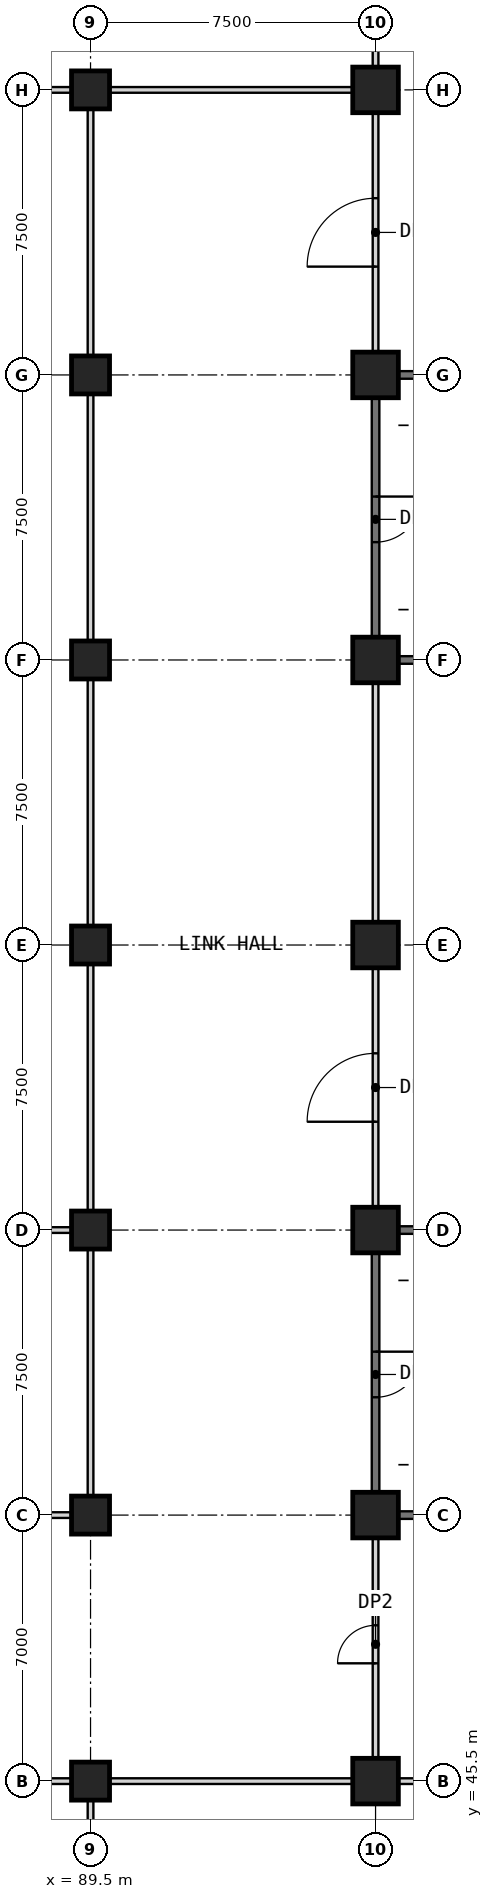
"""IFC4 building model, lengths in metres.
Left out: names, types, materials, properties, quantities, classifications, styles, units other than length and angle.
Written with IfcOpenShell. Run it as: python <this file> out.ifc"""

import sys

from ifc_helpers import new_model, si_unit, direction, frame, frame_2d, origin, origin_2d, place, context, subcontext, project, spatial, rectangle, extrude, element, fill, save


model = new_model("IFC4")
c1 = context("Model", 3, precision=1e-05, world=origin(), true_north=direction((0.0, 1.0)))
c2 = subcontext(c1, "Body", "Model", "MODEL_VIEW")
j1 = project(units=[si_unit("LENGTHUNIT", "METRE"), si_unit("PLANEANGLEUNIT", "RADIAN")], contexts=[c1])
p1 = place(None, origin())
s1 = spatial("IfcSite", under=j1, at=p1, CompositionType="ELEMENT")
p2 = place(p1, origin())
s2 = spatial("IfcBuilding", under=s1, at=p2, CompositionType="ELEMENT")
p3 = place(p2, frame((0.0, 0.0, 23.5)))
s3 = spatial("IfcBuildingStorey", under=s2, at=p3, CompositionType="ELEMENT", Elevation=23.5)
for number, where, z_axis, x_axis in (
    (1, (89.5, 45.5, 0.0), (0.0, 0.0, 1.0), (1.0, 0.0, 0.0)),
    (2, (89.5, 52.5, 0.0), (0.0, 0.0, 1.0), (1.0, 0.0, 0.0)),
    (3, (89.5, 60.0, 0.0), (0.0, 0.0, 1.0), (1.0, 0.0, 0.0)),
    (4, (89.5, 67.5, 0.0), (0.0, 0.0, 1.0), (1.0, 0.0, 0.0)),
    (5, (89.5, 75.0, 0.0), (0.0, 0.0, 1.0), (1.0, 0.0, 0.0)),
    (6, (89.5, 82.5, 0.0), (0.0, 0.0, 1.0), (1.0, 0.0, 0.0)),
    (7, (89.5, 90.0, 0.0), (0.0, 0.0, 1.0), (1.0, 0.0, 0.0)),
):
    element("IfcColumn", number, at=place(p3, frame(where, z_axis=z_axis, x_axis=x_axis)), inside=s3, PredefinedType="COLUMN", context=c2, shape_type="SweptSolid", body=[
        extrude(rectangle(XDim=1.0, YDim=1.0, at=origin_2d()), origin(), (0.0, 0.0, 1.0), 5.5),
    ])
for number, where, z_axis, x_axis in (
    (8, (97.0, 45.5, 0.0), (0.0, 0.0, 1.0), (1.0, 0.0, 0.0)),
    (9, (97.0, 52.5, 0.0), (0.0, 0.0, 1.0), (1.0, 0.0, 0.0)),
    (10, (97.0, 60.0, 0.0), (0.0, 0.0, 1.0), (1.0, 0.0, 0.0)),
    (11, (97.0, 67.5, 0.0), (0.0, 0.0, 1.0), (1.0, 0.0, 0.0)),
    (12, (97.0, 75.0, 0.0), (0.0, 0.0, 1.0), (1.0, 0.0, 0.0)),
    (13, (97.0, 82.5, 0.0), (0.0, 0.0, 1.0), (1.0, 0.0, 0.0)),
    (14, (97.0, 90.0, 0.0), (0.0, 0.0, 1.0), (1.0, 0.0, 0.0)),
):
    element("IfcColumn", number, at=place(p3, frame(where, z_axis=z_axis, x_axis=x_axis)), inside=s3, PredefinedType="COLUMN", context=c2, shape_type="SweptSolid", body=[
        extrude(rectangle(XDim=1.2, YDim=1.2, at=origin_2d()), origin(), (0.0, 0.0, 1.0), 5.5),
    ])
for number, where, z_axis, x_axis in (
    (15, (82.6, 45.5, 0.0), (0.0, 0.0, 1.0), (1.0, 0.0, 0.0)),
    (16, (90.0, 45.5, 0.0), (0.0, 0.0, 1.0), (1.0, 0.0, 0.0)),
):
    element("IfcWall", number, at=place(p3, frame(where, z_axis=z_axis, x_axis=x_axis)), inside=s3, PredefinedType="PARTITIONING", context=c2, shape_type="SweptSolid", body=[
        extrude(rectangle(XDim=6.4, YDim=0.15, at=frame_2d((3.2, 0.0))), origin(), (0.0, 0.0, 1.0), 5.2),
    ])
p4 = place(p3, frame((97.6, 45.5, 0.0), z_axis=(0.0, 0.0, 1.0), x_axis=(1.0, 0.0, 0.0)))
e17 = element("IfcWall", 17, at=p4, inside=s3, PredefinedType="PARTITIONING", context=c2, shape_type="SweptSolid", body=[
    extrude(rectangle(XDim=6.3, YDim=0.15, at=frame_2d((3.15, 0.0))), origin(), (0.0, 0.0, 1.0), 5.2),
])
p5 = place(p4, frame((2.25, 0.0, 0.0)))
e18 = element("IfcOpeningElement", 18, at=p5, cuts=e17, PredefinedType="OPENING", context=c2, shape_type="SweptSolid", body=[
    extrude(rectangle(XDim=1.8, YDim=2.4, at=frame_2d((0.9, 1.2))), frame((0.0, 0.085, 0.0), z_axis=(0.0, -1.0, 0.0), x_axis=(1.0, 0.0, 0.0)), (0.0, 0.0, 1.0), 0.17),
])
p6 = place(p3, frame((89.0, 52.5, 0.0), z_axis=(0.0, 0.0, 1.0), x_axis=(-1.0, 0.0, 0.0)))
e19 = element("IfcWall", 19, at=p6, inside=s3, PredefinedType="PARTITIONING", context=c2, shape_type="SweptSolid", body=[
    extrude(rectangle(XDim=6.4, YDim=0.15, at=frame_2d((3.2, 0.0))), origin(), (0.0, 0.0, 1.0), 5.2),
])
p7 = place(p6, frame((4.1, 0.0, 0.0)))
e20 = element("IfcOpeningElement", 20, at=p7, cuts=e19, PredefinedType="OPENING", context=c2, shape_type="SweptSolid", body=[
    extrude(rectangle(XDim=1.8, YDim=2.4, at=frame_2d((0.9, 1.2))), frame((0.0, 0.085, 0.0), z_axis=(0.0, -1.0, 0.0), x_axis=(1.0, 0.0, 0.0)), (0.0, 0.0, 1.0), 0.17),
])
p8 = place(p3, frame((97.6, 52.5, 0.0), z_axis=(0.0, 0.0, 1.0), x_axis=(1.0, 0.0, 0.0)))
e21 = element("IfcWall", 21, at=p8, inside=s3, PredefinedType="SHEAR", context=c2, shape_type="SweptSolid", body=[
    extrude(rectangle(XDim=6.3, YDim=0.2, at=frame_2d((3.15, 0.0))), origin(), (0.0, 0.0, 1.0), 5.2),
])
p9 = place(p3, frame((82.6, 60.0, 0.0), z_axis=(0.0, 0.0, 1.0), x_axis=(1.0, 0.0, 0.0)))
e22 = element("IfcWall", 22, at=p9, inside=s3, PredefinedType="PARTITIONING", context=c2, shape_type="SweptSolid", body=[
    extrude(rectangle(XDim=6.4, YDim=0.15, at=frame_2d((3.2, 0.0))), origin(), (0.0, 0.0, 1.0), 5.2),
])
for number, where, z_axis, x_axis in (
    (23, (97.6, 60.0, 0.0), (0.0, 0.0, 1.0), (1.0, 0.0, 0.0)),
    (24, (97.6, 75.0, 0.0), (0.0, 0.0, 1.0), (1.0, 0.0, 0.0)),
    (25, (97.6, 82.5, 0.0), (0.0, 0.0, 1.0), (1.0, 0.0, 0.0)),
):
    element("IfcWall", number, at=place(p3, frame(where, z_axis=z_axis, x_axis=x_axis)), inside=s3, PredefinedType="SHEAR", context=c2, shape_type="SweptSolid", body=[
        extrude(rectangle(XDim=6.3, YDim=0.2, at=frame_2d((3.15, 0.0))), origin(), (0.0, 0.0, 1.0), 5.2),
    ])
for number, where, z_axis, x_axis in (
    (26, (82.6, 90.0, 0.0), (0.0, 0.0, 1.0), (1.0, 0.0, 0.0)),
    (27, (90.0, 90.0, 0.0), (0.0, 0.0, 1.0), (1.0, 0.0, 0.0)),
):
    element("IfcWall", number, at=place(p3, frame(where, z_axis=z_axis, x_axis=x_axis)), inside=s3, PredefinedType="PARTITIONING", context=c2, shape_type="SweptSolid", body=[
        extrude(rectangle(XDim=6.4, YDim=0.15, at=frame_2d((3.2, 0.0))), origin(), (0.0, 0.0, 1.0), 5.2),
    ])
p10 = place(p3, frame((97.0, 46.1, 0.0), z_axis=(0.0, 0.0, 1.0), x_axis=(0.0, 1.0, 0.0)))
e28 = element("IfcWall", 28, at=p10, inside=s3, PredefinedType="PARTITIONING", context=c2, shape_type="SweptSolid", body=[
    extrude(rectangle(XDim=5.8, YDim=0.15, at=frame_2d((2.9, 0.0))), origin(), (0.0, 0.0, 1.0), 5.2),
])
p11 = place(p10, frame((2.5, 0.0, 0.0)))
e29 = element("IfcOpeningElement", 29, at=p11, cuts=e28, PredefinedType="OPENING", context=c2, shape_type="SweptSolid", body=[
    extrude(rectangle(XDim=1.0, YDim=2.1, at=frame_2d((0.5, 1.05))), frame((0.0, 0.085, 0.0), z_axis=(0.0, -1.0, 0.0), x_axis=(1.0, 0.0, 0.0)), (0.0, 0.0, 1.0), 0.17),
])
p12 = place(p3, frame((97.0, 59.4, 0.0), z_axis=(0.0, 0.0, 1.0), x_axis=(0.0, -1.0, 0.0)))
e30 = element("IfcWall", 30, at=p12, inside=s3, PredefinedType="SHEAR", context=c2, shape_type="SweptSolid", body=[
    extrude(rectangle(XDim=6.3, YDim=0.2, at=frame_2d((3.15, 0.0))), origin(), (0.0, 0.0, 1.0), 5.2),
])
p13 = place(p12, frame((2.6, 0.0, 0.0)))
e31 = element("IfcOpeningElement", 31, at=p13, cuts=e30, PredefinedType="OPENING", context=c2, shape_type="SweptSolid", body=[
    extrude(rectangle(XDim=1.2, YDim=2.1, at=frame_2d((0.6, 1.05))), frame((0.0, 0.11, 0.0), z_axis=(0.0, -1.0, 0.0), x_axis=(1.0, 0.0, 0.0)), (0.0, 0.0, 1.0), 0.22),
])
p14 = place(p3, frame((97.0, 60.6, 0.0), z_axis=(0.0, 0.0, 1.0), x_axis=(0.0, 1.0, 0.0)))
e32 = element("IfcWall", 32, at=p14, inside=s3, PredefinedType="PARTITIONING", context=c2, shape_type="SweptSolid", body=[
    extrude(rectangle(XDim=6.3, YDim=0.15, at=frame_2d((3.15, 0.0))), origin(), (0.0, 0.0, 1.0), 5.2),
])
p15 = place(p14, frame((2.25, 0.0, 0.0)))
e33 = element("IfcOpeningElement", 33, at=p15, cuts=e32, PredefinedType="OPENING", context=c2, shape_type="SweptSolid", body=[
    extrude(rectangle(XDim=1.8, YDim=2.4, at=frame_2d((0.9, 1.2))), frame((0.0, 0.085, 0.0), z_axis=(0.0, -1.0, 0.0), x_axis=(1.0, 0.0, 0.0)), (0.0, 0.0, 1.0), 0.17),
])
p16 = place(p3, frame((97.0, 68.1, 0.0), z_axis=(0.0, 0.0, 1.0), x_axis=(0.0, 1.0, 0.0)))
e34 = element("IfcWall", 34, at=p16, inside=s3, PredefinedType="PARTITIONING", context=c2, shape_type="SweptSolid", body=[
    extrude(rectangle(XDim=6.3, YDim=0.15, at=frame_2d((3.15, 0.0))), origin(), (0.0, 0.0, 1.0), 5.2),
])
p17 = place(p3, frame((97.0, 81.9, 0.0), z_axis=(0.0, 0.0, 1.0), x_axis=(0.0, -1.0, 0.0)))
e35 = element("IfcWall", 35, at=p17, inside=s3, PredefinedType="SHEAR", context=c2, shape_type="SweptSolid", body=[
    extrude(rectangle(XDim=6.3, YDim=0.2, at=frame_2d((3.15, 0.0))), origin(), (0.0, 0.0, 1.0), 5.2),
])
p18 = place(p17, frame((2.6, 0.0, 0.0)))
e36 = element("IfcOpeningElement", 36, at=p18, cuts=e35, PredefinedType="OPENING", context=c2, shape_type="SweptSolid", body=[
    extrude(rectangle(XDim=1.2, YDim=2.1, at=frame_2d((0.6, 1.05))), frame((0.0, 0.11, 0.0), z_axis=(0.0, -1.0, 0.0), x_axis=(1.0, 0.0, 0.0)), (0.0, 0.0, 1.0), 0.22),
])
p19 = place(p3, frame((97.0, 83.1, 0.0), z_axis=(0.0, 0.0, 1.0), x_axis=(0.0, 1.0, 0.0)))
e37 = element("IfcWall", 37, at=p19, inside=s3, PredefinedType="PARTITIONING", context=c2, shape_type="SweptSolid", body=[
    extrude(rectangle(XDim=6.3, YDim=0.15, at=frame_2d((3.15, 0.0))), origin(), (0.0, 0.0, 1.0), 5.2),
])
p20 = place(p19, frame((2.25, 0.0, 0.0)))
e38 = element("IfcOpeningElement", 38, at=p20, cuts=e37, PredefinedType="OPENING", context=c2, shape_type="SweptSolid", body=[
    extrude(rectangle(XDim=1.8, YDim=2.4, at=frame_2d((0.9, 1.2))), frame((0.0, 0.085, 0.0), z_axis=(0.0, -1.0, 0.0), x_axis=(1.0, 0.0, 0.0)), (0.0, 0.0, 1.0), 0.17),
])
p21 = place(p3, frame((97.0, 90.6, 0.0), z_axis=(0.0, 0.0, 1.0), x_axis=(0.0, 1.0, 0.0)))
e39 = element("IfcWall", 39, at=p21, inside=s3, PredefinedType="PARTITIONING", context=c2, shape_type="SweptSolid", body=[
    extrude(rectangle(XDim=5.8, YDim=0.15, at=frame_2d((2.9, 0.0))), origin(), (0.0, 0.0, 1.0), 5.2),
])
p22 = place(p3, frame((89.5, 38.6, 0.0), z_axis=(0.0, 0.0, 1.0), x_axis=(0.0, 1.0, 0.0)))
e40 = element("IfcWall", 40, at=p22, inside=s3, PredefinedType="PARTITIONING", context=c2, shape_type="SweptSolid", body=[
    extrude(rectangle(XDim=6.4, YDim=0.15, at=frame_2d((3.2, 0.0))), origin(), (0.0, 0.0, 1.0), 5.2),
])
for number, where, z_axis, x_axis in (
    (41, (89.5, 53.0, 0.0), (0.0, 0.0, 1.0), (0.0, 1.0, 0.0)),
    (42, (89.5, 60.5, 0.0), (0.0, 0.0, 1.0), (0.0, 1.0, 0.0)),
    (43, (89.5, 68.0, 0.0), (0.0, 0.0, 1.0), (0.0, 1.0, 0.0)),
    (44, (89.5, 75.5, 0.0), (0.0, 0.0, 1.0), (0.0, 1.0, 0.0)),
    (45, (89.5, 83.0, 0.0), (0.0, 0.0, 1.0), (0.0, 1.0, 0.0)),
):
    element("IfcWall", number, at=place(p3, frame(where, z_axis=z_axis, x_axis=x_axis)), inside=s3, PredefinedType="PARTITIONING", context=c2, shape_type="SweptSolid", body=[
        extrude(rectangle(XDim=6.5, YDim=0.15, at=frame_2d((3.25, 0.0))), origin(), (0.0, 0.0, 1.0), 5.2),
    ])
p23 = place(p11, origin())
e46 = element("IfcDoor", 46, at=p23, inside=s3, OperationType="SINGLE_SWING_LEFT", PredefinedType="DOOR", context=c2, shape_type="SweptSolid", body=[
    extrude(rectangle(XDim=1.0, YDim=2.1, at=frame_2d((0.5, 1.05))), frame((0.0, 0.025, 0.0), z_axis=(0.0, -1.0, 0.0), x_axis=(1.0, 0.0, 0.0)), (0.0, 0.0, 1.0), 0.05),
])
fill(e29, e46)
p24 = place(p13, origin())
e47 = element("IfcDoor", 47, at=p24, inside=s3, OperationType="SINGLE_SWING_LEFT", PredefinedType="DOOR", context=c2, shape_type="SweptSolid", body=[
    extrude(rectangle(XDim=1.2, YDim=2.1, at=frame_2d((0.6, 1.05))), frame((0.0, 0.025, 0.0), z_axis=(0.0, -1.0, 0.0), x_axis=(1.0, 0.0, 0.0)), (0.0, 0.0, 1.0), 0.05),
])
fill(e31, e47)
p25 = place(p15, origin())
e48 = element("IfcDoor", 48, at=p25, inside=s3, OperationType="SINGLE_SWING_LEFT", PredefinedType="DOOR", context=c2, shape_type="SweptSolid", body=[
    extrude(rectangle(XDim=1.8, YDim=2.4, at=frame_2d((0.9, 1.2))), frame((0.0, 0.025, 0.0), z_axis=(0.0, -1.0, 0.0), x_axis=(1.0, 0.0, 0.0)), (0.0, 0.0, 1.0), 0.05),
])
fill(e33, e48)
p26 = place(p18, origin())
e49 = element("IfcDoor", 49, at=p26, inside=s3, OperationType="SINGLE_SWING_LEFT", PredefinedType="DOOR", context=c2, shape_type="SweptSolid", body=[
    extrude(rectangle(XDim=1.2, YDim=2.1, at=frame_2d((0.6, 1.05))), frame((0.0, 0.025, 0.0), z_axis=(0.0, -1.0, 0.0), x_axis=(1.0, 0.0, 0.0)), (0.0, 0.0, 1.0), 0.05),
])
fill(e36, e49)
p27 = place(p20, origin())
e50 = element("IfcDoor", 50, at=p27, inside=s3, OperationType="SINGLE_SWING_LEFT", PredefinedType="DOOR", context=c2, shape_type="SweptSolid", body=[
    extrude(rectangle(XDim=1.8, YDim=2.4, at=frame_2d((0.9, 1.2))), frame((0.0, 0.025, 0.0), z_axis=(0.0, -1.0, 0.0), x_axis=(1.0, 0.0, 0.0)), (0.0, 0.0, 1.0), 0.05),
])
fill(e38, e50)
save(model, sys.argv[1])
